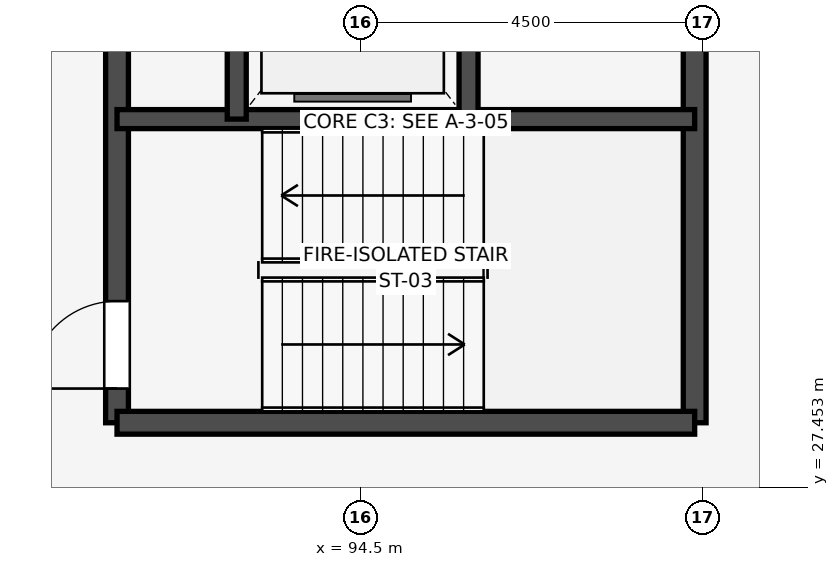
"""IFC4 building model, lengths in metres.
Left out: names, types, materials, properties, quantities, classifications, styles, units other than length and angle.
Written with IfcOpenShell. Run it as: python <this file> out.ifc"""

import sys

from ifc_helpers import new_model, si_unit, direction, frame, frame_2d, origin, place, context, subcontext, project, spatial, rectangle, extrude, element, fill, save


model = new_model("IFC4")
c1 = context("Model", 3, precision=1e-05, world=origin(), true_north=direction((0.0, 1.0)))
c2 = subcontext(c1, "Body", "Model", "MODEL_VIEW")
j1 = project(units=[si_unit("LENGTHUNIT", "METRE"), si_unit("PLANEANGLEUNIT", "RADIAN")], contexts=[c1])
p1 = place(None, origin())
s1 = spatial("IfcSite", under=j1, at=p1, CompositionType="ELEMENT")
p2 = place(p1, origin())
s2 = spatial("IfcBuilding", under=s1, at=p2, CompositionType="ELEMENT")
p3 = place(p2, frame((0.0, 0.0, -4.5)))
s3 = spatial("IfcBuildingStorey", under=s2, at=p3, CompositionType="ELEMENT", Elevation=-4.5)
p4 = place(p3, frame((91.3, 28.3, 0.0), z_axis=(0.0, 0.0, 1.0), x_axis=(0.0, 1.0, 0.0)))
e1 = element("IfcWall", 1, at=p4, inside=s3, PredefinedType="SHEAR", context=c2, shape_type="SweptSolid", body=[
    extrude(rectangle(XDim=7.9, YDim=0.3, at=frame_2d((3.95, 0.0))), origin(), (0.0, 0.0, 1.0), 4.5),
])
p5 = place(p4, frame((0.45, 0.0, 0.0)))
e2 = element("IfcOpeningElement", 2, at=p5, cuts=e1, PredefinedType="OPENING", context=c2, shape_type="SweptSolid", body=[
    extrude(rectangle(XDim=1.15, YDim=2.15, at=frame_2d((0.575, 1.075))), frame((0.0, 0.16, 0.0), z_axis=(0.0, -1.0, 0.0), x_axis=(1.0, 0.0, 0.0)), (0.0, 0.0, 1.0), 0.32),
])
p6 = place(p3, frame((98.9, 28.3, 0.0), z_axis=(0.0, 0.0, 1.0), x_axis=(0.0, 1.0, 0.0)))
e3 = element("IfcWall", 3, at=p6, inside=s3, PredefinedType="SHEAR", context=c2, shape_type="SweptSolid", body=[
    extrude(rectangle(XDim=7.9, YDim=0.3, at=frame_2d((3.95, 0.0))), origin(), (0.0, 0.0, 1.0), 4.5),
])
p7 = place(p3, frame((91.3, 28.3, 0.0), z_axis=(0.0, 0.0, 1.0), x_axis=(1.0, 0.0, 0.0)))
e4 = element("IfcWall", 4, at=p7, inside=s3, PredefinedType="SHEAR", context=c2, shape_type="SweptSolid", body=[
    extrude(rectangle(XDim=7.6, YDim=0.3, at=frame_2d((3.8, 0.0))), origin(), (0.0, 0.0, 1.0), 4.5),
])
p8 = place(p3, frame((91.3, 32.295, 0.0), z_axis=(0.0, 0.0, 1.0), x_axis=(1.0, 0.0, 0.0)))
e5 = element("IfcWall", 5, at=p8, inside=s3, PredefinedType="SHEAR", context=c2, shape_type="SweptSolid", body=[
    extrude(rectangle(XDim=7.6, YDim=0.25, at=frame_2d((3.8, 0.0))), origin(), (0.0, 0.0, 1.0), 4.5),
])
for number, where, z_axis, x_axis in (
    (6, (92.875, 32.295, 0.0), (0.0, 0.0, 1.0), (0.0, 1.0, 0.0)),
    (7, (95.925, 32.295, 0.0), (0.0, 0.0, 1.0), (0.0, 1.0, 0.0)),
):
    element("IfcWall", number, at=place(p3, frame(where, z_axis=z_axis, x_axis=x_axis)), inside=s3, PredefinedType="SHEAR", context=c2, shape_type="SweptSolid", body=[
        extrude(rectangle(XDim=3.905, YDim=0.25, at=frame_2d((1.953, 0.0))), origin(), (0.0, 0.0, 1.0), 4.5),
    ])
p9 = place(p5, origin())
e8 = element("IfcDoor", 8, at=p9, inside=s3, OperationType="SINGLE_SWING_LEFT", PredefinedType="DOOR", context=c2, shape_type="SweptSolid", body=[
    extrude(rectangle(XDim=1.15, YDim=2.15, at=frame_2d((0.575, 1.075))), frame((0.0, 0.025, 0.0), z_axis=(0.0, -1.0, 0.0), x_axis=(1.0, 0.0, 0.0)), (0.0, 0.0, 1.0), 0.05),
])
fill(e2, e8)
save(model, sys.argv[1])
